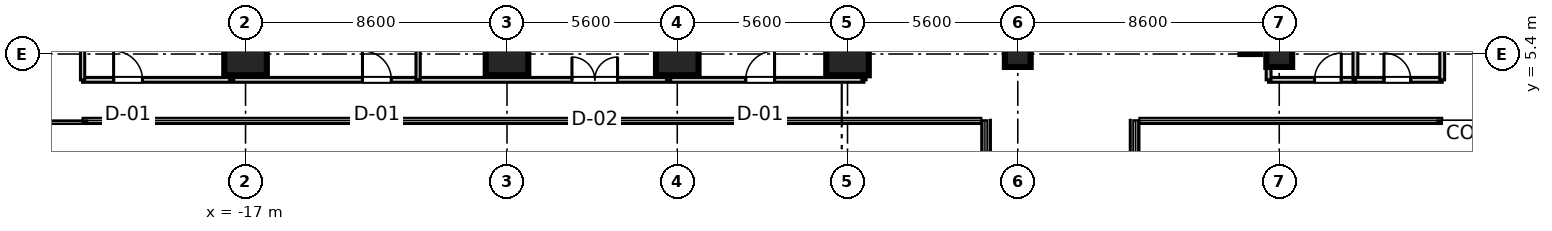
"""IFC4 building model, lengths in metres.
Left out: names, types, materials, properties, quantities, classifications, styles, units other than length and angle.
Written with IfcOpenShell. Run it as: python <this file> out.ifc"""

import sys

from ifc_helpers import new_model, si_unit, direction, frame, frame_2d, origin, origin_2d, place, context, subcontext, project, spatial, rectangle, extrude, source, transform, mapped, element, fill, save


model = new_model("IFC4")
c1 = context("Model", 3, precision=1e-05, world=origin(), true_north=direction((0.0, 1.0)))
c2 = subcontext(c1, "Body", "Model", "MODEL_VIEW")
j1 = project(units=[si_unit("LENGTHUNIT", "METRE"), si_unit("PLANEANGLEUNIT", "RADIAN")], contexts=[c1])
p1 = place(None, origin())
s1 = spatial("IfcSite", under=j1, at=p1, CompositionType="ELEMENT")
p2 = place(p1, origin())
s2 = spatial("IfcBuilding", under=s1, at=p2, CompositionType="ELEMENT")
p3 = place(p2, frame((0.0, 0.0, 61.6)))
s3 = spatial("IfcBuildingStorey", under=s2, at=p3, CompositionType="ELEMENT", Elevation=61.6)
m1 = source(origin(), c2, "Body", "SweptSolid", [
    extrude(rectangle(XDim=1.4, YDim=1.4, at=origin_2d()), origin(), (0.0, 0.0, 1.0), 3.605),
])
for number, where, z_axis, x_axis in (
    (1, (-17.0, 5.4, 0.0), (0.0, 0.0, 1.0), (1.0, 0.0, 0.0)),
    (2, (-8.4, 5.4, 0.0), (0.0, 0.0, 1.0), (1.0, 0.0, 0.0)),
    (3, (-2.8, 5.4, 0.0), (0.0, 0.0, 1.0), (1.0, 0.0, 0.0)),
    (4, (2.8, 5.4, 0.0), (0.0, 0.0, 1.0), (1.0, 0.0, 0.0)),
):
    element("IfcColumn", number, at=place(p3, frame(where, z_axis=z_axis, x_axis=x_axis)), inside=s3, PredefinedType="COLUMN", context=c2, shape_type="MappedRepresentation", body=[
        mapped(m1, transform((0.0, 0.0, 0.0), scale=1.0)),
    ])
m2 = source(origin(), c2, "Body", "SweptSolid", [
    extrude(rectangle(XDim=0.85, YDim=0.85, at=origin_2d()), origin(), (0.0, 0.0, 1.0), 3.605),
])
for number, where, z_axis, x_axis in (
    (5, (8.4, 5.4, 0.0), (0.0, 0.0, 1.0), (1.0, 0.0, 0.0)),
    (6, (17.0, 5.4, 0.0), (0.0, 0.0, 1.0), (1.0, 0.0, 0.0)),
):
    element("IfcColumn", number, at=place(p3, frame(where, z_axis=z_axis, x_axis=x_axis)), inside=s3, PredefinedType="PILASTER", context=c2, shape_type="MappedRepresentation", body=[
        mapped(m2, transform((0.0, 0.0, 0.0), scale=1.0)),
    ])
m3 = source(origin(), c2, "Body", "SweptSolid", [
    extrude(rectangle(XDim=11.6, YDim=0.65, at=frame_2d((5.8, 0.0))), origin(), (0.0, 0.0, 1.0), 3.37),
])
p4 = place(p3, frame((16.05, 5.4, 0.0), z_axis=(0.0, 0.0, 1.0), x_axis=(0.0, 1.0, 0.0)))
e7 = element("IfcWall", 7, at=p4, inside=s3, PredefinedType="SHEAR", context=c2, shape_type="MappedRepresentation", body=[
    mapped(m3, transform((0.0, 0.0, 0.0), scale=1.0)),
])
m4 = source(origin(), c2, "Body", "SweptSolid", [
    extrude(rectangle(XDim=2.855, YDim=0.16, at=frame_2d((1.427, 0.0))), origin(), (0.0, 0.0, 1.0), 2.71),
])
p5 = place(p3, frame((16.65, 4.55, 0.0), z_axis=(0.0, 0.0, 1.0), x_axis=(1.0, 0.0, 0.0)))
e8 = element("IfcWall", 8, at=p5, inside=s3, PredefinedType="PARTITIONING", context=c2, shape_type="MappedRepresentation", body=[
    mapped(m4, transform((0.0, 0.0, 0.0), scale=1.0)),
])
p6 = place(p5, frame((1.511, 0.0, 0.0)))
e9 = element("IfcOpeningElement", 9, at=p6, cuts=e8, PredefinedType="OPENING", context=c2, shape_type="SweptSolid", body=[
    extrude(rectangle(XDim=0.88, YDim=2.1, at=frame_2d((0.44, 1.05))), frame((0.0, 0.09, 0.0), z_axis=(0.0, -1.0, 0.0), x_axis=(1.0, 0.0, 0.0)), (0.0, 0.0, 1.0), 0.18),
])
m5 = source(origin(), c2, "Body", "SweptSolid", [
    extrude(rectangle(XDim=20.55, YDim=0.16, at=frame_2d((10.275, 0.0))), origin(), (0.0, 0.0, 1.0), 2.71),
])
for number, where, z_axis, x_axis in (
    (10, (16.65, 4.55, 0.0), (0.0, 0.0, 1.0), (0.0, 1.0, 0.0)),
    (11, (19.505, 4.55, 0.0), (0.0, 0.0, 1.0), (0.0, 1.0, 0.0)),
):
    element("IfcWall", number, at=place(p3, frame(where, z_axis=z_axis, x_axis=x_axis)), inside=s3, PredefinedType="PARTITIONING", context=c2, shape_type="MappedRepresentation", body=[
        mapped(m5, transform((0.0, 0.0, 0.0), scale=1.0)),
    ])
m6 = source(origin(), c2, "Body", "SweptSolid", [
    extrude(rectangle(XDim=2.855, YDim=0.16, at=frame_2d((1.428, 0.0))), origin(), (0.0, 0.0, 1.0), 2.71),
])
p7 = place(p3, frame((19.505, 4.55, 0.0), z_axis=(0.0, 0.0, 1.0), x_axis=(1.0, 0.0, 0.0)))
e12 = element("IfcWall", 12, at=p7, inside=s3, PredefinedType="PARTITIONING", context=c2, shape_type="MappedRepresentation", body=[
    mapped(m6, transform((0.0, 0.0, 0.0), scale=1.0)),
])
p8 = place(p7, frame((0.94, 0.0, 0.0)))
e13 = element("IfcOpeningElement", 13, at=p8, cuts=e12, PredefinedType="OPENING", context=c2, shape_type="SweptSolid", body=[
    extrude(rectangle(XDim=0.88, YDim=2.1, at=frame_2d((0.44, 1.05))), frame((0.0, 0.09, 0.0), z_axis=(0.0, -1.0, 0.0), x_axis=(1.0, 0.0, 0.0)), (0.0, 0.0, 1.0), 0.18),
])
m7 = source(origin(), c2, "Body", "SweptSolid", [
    extrude(rectangle(XDim=19.13, YDim=0.16, at=frame_2d((9.565, 0.0))), origin(), (0.0, 0.0, 1.0), 2.71),
])
p9 = place(p3, frame((22.36, 4.55, 0.0), z_axis=(0.0, 0.0, 1.0), x_axis=(0.0, 1.0, 0.0)))
e14 = element("IfcWall", 14, at=p9, inside=s3, PredefinedType="PARTITIONING", context=c2, shape_type="MappedRepresentation", body=[
    mapped(m7, transform((0.0, 0.0, 0.0), scale=1.0)),
])
m8 = source(origin(), c2, "Body", "SweptSolid", [
    extrude(rectangle(XDim=25.7, YDim=0.16, at=frame_2d((12.85, 0.0))), origin(), (0.0, 0.0, 1.0), 2.71),
])
p10 = place(p3, frame((-22.36, 4.55, 0.0), z_axis=(0.0, 0.0, 1.0), x_axis=(1.0, 0.0, 0.0)))
e15 = element("IfcWall", 15, at=p10, inside=s3, PredefinedType="PARTITIONING", context=c2, shape_type="MappedRepresentation", body=[
    mapped(m8, transform((0.0, 0.0, 0.0), scale=1.0)),
])
p11 = place(p10, frame((1.02, 0.0, 0.0)))
e16 = element("IfcOpeningElement", 16, at=p11, cuts=e15, PredefinedType="OPENING", context=c2, shape_type="SweptSolid", body=[
    extrude(rectangle(XDim=0.95, YDim=2.1, at=frame_2d((0.475, 1.05))), frame((0.0, 0.09, 0.0), z_axis=(0.0, -1.0, 0.0), x_axis=(1.0, 0.0, 0.0)), (0.0, 0.0, 1.0), 0.18),
])
p12 = place(p10, frame((9.206, 0.0, 0.0)))
e17 = element("IfcOpeningElement", 17, at=p12, cuts=e15, PredefinedType="OPENING", context=c2, shape_type="SweptSolid", body=[
    extrude(rectangle(XDim=0.95, YDim=2.1, at=frame_2d((0.475, 1.05))), frame((0.0, 0.09, 0.0), z_axis=(0.0, -1.0, 0.0), x_axis=(1.0, 0.0, 0.0)), (0.0, 0.0, 1.0), 0.18),
])
p13 = place(p10, frame((16.096, 0.0, 0.0)))
e18 = element("IfcOpeningElement", 18, at=p13, cuts=e15, PredefinedType="OPENING", context=c2, shape_type="SweptSolid", body=[
    extrude(rectangle(XDim=1.5, YDim=2.15, at=frame_2d((0.75, 1.075))), frame((0.0, 0.09, 0.0), z_axis=(0.0, -1.0, 0.0), x_axis=(1.0, 0.0, 0.0)), (0.0, 0.0, 1.0), 0.18),
])
p14 = place(p10, frame((21.81, 0.0, 0.0)))
e19 = element("IfcOpeningElement", 19, at=p14, cuts=e15, PredefinedType="OPENING", context=c2, shape_type="SweptSolid", body=[
    extrude(rectangle(XDim=0.95, YDim=2.1, at=frame_2d((0.475, 1.05))), frame((0.0, 0.09, 0.0), z_axis=(0.0, -1.0, 0.0), x_axis=(1.0, 0.0, 0.0)), (0.0, 0.0, 1.0), 0.18),
])
m9 = source(origin(), c2, "Body", "SweptSolid", [
    extrude(rectangle(XDim=19.13, YDim=0.14, at=frame_2d((9.565, 0.0))), origin(), (0.0, 0.0, 1.0), 2.71),
])
p15 = place(p3, frame((-22.36, 4.55, 0.0), z_axis=(0.0, 0.0, 1.0), x_axis=(0.0, 1.0, 0.0)))
e20 = element("IfcWall", 20, at=p15, inside=s3, PredefinedType="PARTITIONING", context=c2, shape_type="MappedRepresentation", body=[
    mapped(m9, transform((0.0, 0.0, 0.0), scale=1.0)),
])
m10 = source(origin(), c2, "Body", "SweptSolid", [
    extrude(rectangle(XDim=20.55, YDim=0.14, at=frame_2d((10.275, 0.0))), origin(), (0.0, 0.0, 1.0), 2.71),
])
for number, where, z_axis, x_axis in (
    (21, (3.34, 4.55, 0.0), (0.0, 0.0, 1.0), (0.0, 1.0, 0.0)),
    (22, (-17.456, 4.55, 0.0), (0.0, 0.0, 1.0), (0.0, 1.0, 0.0)),
    (23, (-11.324, 4.55, 0.0), (0.0, 0.0, 1.0), (0.0, 1.0, 0.0)),
    (24, (-3.085, 4.55, 0.0), (0.0, 0.0, 1.0), (0.0, 1.0, 0.0)),
):
    element("IfcWall", number, at=place(p3, frame(where, z_axis=z_axis, x_axis=x_axis)), inside=s3, PredefinedType="PARTITIONING", context=c2, shape_type="MappedRepresentation", body=[
        mapped(m10, transform((0.0, 0.0, 0.0), scale=1.0)),
    ])
m11 = source(origin(), c2, "Body", "SweptSolid", [
    extrude(rectangle(XDim=0.88, YDim=2.1, at=frame_2d((0.44, 1.05))), frame((0.0, 0.025, 0.0), z_axis=(0.0, -1.0, 0.0), x_axis=(1.0, 0.0, 0.0)), (0.0, 0.0, 1.0), 0.05),
])
p16 = place(p6, origin())
e25 = element("IfcDoor", 25, at=p16, inside=s3, OperationType="SINGLE_SWING_RIGHT", PredefinedType="DOOR", context=c2, shape_type="MappedRepresentation", body=[
    mapped(m11, transform((0.0, 0.0, 0.0), scale=1.0)),
])
fill(e9, e25)
p17 = place(p8, origin())
e26 = element("IfcDoor", 26, at=p17, inside=s3, OperationType="SINGLE_SWING_LEFT", PredefinedType="DOOR", context=c2, shape_type="MappedRepresentation", body=[
    mapped(m11, transform((0.0, 0.0, 0.0), scale=1.0)),
])
fill(e13, e26)
m12 = source(origin(), c2, "Body", "SweptSolid", [
    extrude(rectangle(XDim=0.95, YDim=2.1, at=frame_2d((0.475, 1.05))), frame((0.0, 0.025, 0.0), z_axis=(0.0, -1.0, 0.0), x_axis=(1.0, 0.0, 0.0)), (0.0, 0.0, 1.0), 0.05),
])
p18 = place(p11, origin())
e27 = element("IfcDoor", 27, at=p18, inside=s3, OperationType="SINGLE_SWING_LEFT", PredefinedType="DOOR", context=c2, shape_type="MappedRepresentation", body=[
    mapped(m12, transform((0.0, 0.0, 0.0), scale=1.0)),
])
fill(e16, e27)
p19 = place(p12, origin())
e28 = element("IfcDoor", 28, at=p19, inside=s3, OperationType="SINGLE_SWING_LEFT", PredefinedType="DOOR", context=c2, shape_type="MappedRepresentation", body=[
    mapped(m12, transform((0.0, 0.0, 0.0), scale=1.0)),
])
fill(e17, e28)
m13 = source(origin(), c2, "Body", "SweptSolid", [
    extrude(rectangle(XDim=1.5, YDim=2.15, at=frame_2d((0.75, 1.075))), frame((0.0, 0.025, 0.0), z_axis=(0.0, -1.0, 0.0), x_axis=(1.0, 0.0, 0.0)), (0.0, 0.0, 1.0), 0.05),
])
p20 = place(p13, origin())
e29 = element("IfcDoor", 29, at=p20, inside=s3, OperationType="DOUBLE_DOOR_SINGLE_SWING", PredefinedType="DOOR", context=c2, shape_type="MappedRepresentation", body=[
    mapped(m13, transform((0.0, 0.0, 0.0), scale=1.0)),
])
fill(e18, e29)
p21 = place(p14, origin())
e30 = element("IfcDoor", 30, at=p21, inside=s3, OperationType="SINGLE_SWING_RIGHT", PredefinedType="DOOR", context=c2, shape_type="MappedRepresentation", body=[
    mapped(m12, transform((0.0, 0.0, 0.0), scale=1.0)),
])
fill(e19, e30)
save(model, sys.argv[1])
